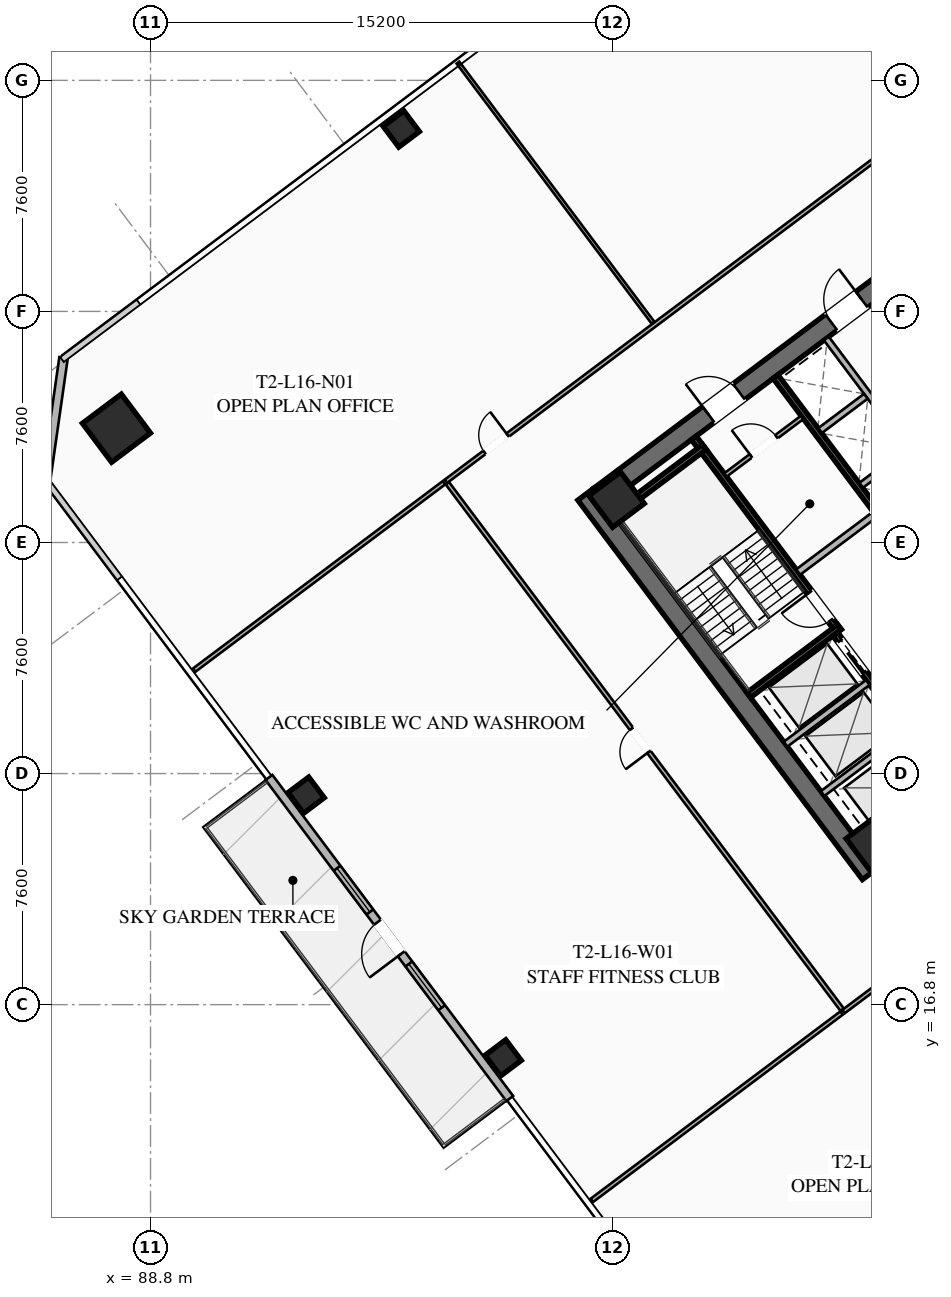
"""IFC4 building model, lengths in metres.
Left out: names, types, materials, properties, quantities, classifications, styles, units other than length and angle.
Written with IfcOpenShell. Run it as: python <this file> out.ifc"""

import sys

from ifc_helpers import new_model, si_unit, direction, frame, frame_2d, origin, origin_2d, place, context, subcontext, project, spatial, rectangle, hollow_rectangle, extrude, element, fill, save


model = new_model("IFC4")
c1 = context("Model", 3, precision=1e-05, world=origin(), true_north=direction((0.0, 1.0)))
c2 = subcontext(c1, "Body", "Model", "MODEL_VIEW")
j1 = project(units=[si_unit("LENGTHUNIT", "METRE"), si_unit("PLANEANGLEUNIT", "RADIAN")], contexts=[c1])
p1 = place(None, origin())
s1 = spatial("IfcSite", under=j1, at=p1, CompositionType="ELEMENT")
p2 = place(p1, origin())
s2 = spatial("IfcBuilding", under=s1, at=p2, CompositionType="ELEMENT")
p3 = place(p2, frame((0.0, 0.0, 63.65)))
s3 = spatial("IfcBuildingStorey", under=s2, at=p3, CompositionType="ELEMENT", Elevation=63.65)
p4 = place(p3, frame((112.476, 21.107, 0.0), z_axis=(0.0, 0.0, 1.0), x_axis=(-0.600005007985, 0.799996243986, 0.0)))
e1 = element("IfcWall", 1, at=p4, inside=s3, PredefinedType="SHEAR", context=c2, shape_type="SweptSolid", body=[
    extrude(rectangle(XDim=15.6, YDim=0.65, at=frame_2d((7.8, 0.0))), origin(), (0.0, 0.0, 1.0), 3.55),
])
p5 = place(p3, frame((124.429, 30.478, 0.0), z_axis=(0.0, 0.0, 1.0), x_axis=(-0.799998028465, -0.600002628705, 0.0)))
e2 = element("IfcWall", 2, at=p5, inside=s3, PredefinedType="SHEAR", context=c2, shape_type="SweptSolid", body=[
    extrude(rectangle(XDim=14.86, YDim=0.65, at=frame_2d((7.43, 0.0))), origin(), (0.0, 0.0, 1.0), 3.55),
])
p6 = place(p5, frame((9.13, 0.0, 0.0)))
e3 = element("IfcOpeningElement", 3, at=p6, cuts=e2, PredefinedType="OPENING", context=c2, shape_type="SweptSolid", body=[
    extrude(rectangle(XDim=1.25, YDim=2.25, at=frame_2d((0.625, 1.125))), frame((0.0, 0.335, 0.0), z_axis=(0.0, -1.0, 0.0), x_axis=(1.0, 0.0, 0.0)), (0.0, 0.0, 1.0), 0.67),
])
p7 = place(p5, frame((4.08, 0.0, 0.0)))
e4 = element("IfcOpeningElement", 4, at=p7, cuts=e2, PredefinedType="OPENING", context=c2, shape_type="SweptSolid", body=[
    extrude(rectangle(XDim=1.25, YDim=2.25, at=frame_2d((0.625, 1.125))), frame((0.0, 0.335, 0.0), z_axis=(0.0, -1.0, 0.0), x_axis=(1.0, 0.0, 0.0)), (0.0, 0.0, 1.0), 0.67),
])
p8 = place(p3, frame((103.571, 33.522, 0.0), z_axis=(0.0, 0.0, 1.0), x_axis=(0.799998028465, 0.600002628705, 0.0)))
e5 = element("IfcWall", 5, at=p8, inside=s3, PredefinedType="SHEAR", context=c2, shape_type="SweptSolid", body=[
    extrude(rectangle(XDim=14.86, YDim=0.65, at=frame_2d((7.43, 0.0))), origin(), (0.0, 0.0, 1.0), 3.55),
])
p9 = place(p8, frame((4.48, 0.0, 0.0)))
e6 = element("IfcOpeningElement", 6, at=p9, cuts=e5, PredefinedType="OPENING", context=c2, shape_type="SweptSolid", body=[
    extrude(rectangle(XDim=1.25, YDim=2.25, at=frame_2d((0.625, 1.125))), frame((0.0, 0.335, 0.0), z_axis=(0.0, -1.0, 0.0), x_axis=(1.0, 0.0, 0.0)), (0.0, 0.0, 1.0), 0.67),
])
p10 = place(p8, frame((9.53, 0.0, 0.0)))
e7 = element("IfcOpeningElement", 7, at=p10, cuts=e5, PredefinedType="OPENING", context=c2, shape_type="SweptSolid", body=[
    extrude(rectangle(XDim=1.25, YDim=2.25, at=frame_2d((0.625, 1.125))), frame((0.0, 0.335, 0.0), z_axis=(0.0, -1.0, 0.0), x_axis=(1.0, 0.0, 0.0)), (0.0, 0.0, 1.0), 0.67),
])
for number, where, z_axis, x_axis in (
    (8, (112.59, 22.13, 0.0), (0.0, 0.0, 1.0), (0.8, 0.6, 0.0)),
    (9, (104.13, 33.41, 0.0), (0.0, 0.0, 1.0), (0.8, 0.6, 0.0)),
):
    element("IfcColumn", number, at=place(p3, frame(where, z_axis=z_axis, x_axis=x_axis)), inside=s3, PredefinedType="COLUMN", context=c2, shape_type="SweptSolid", body=[
        extrude(hollow_rectangle(XDim=1.3, YDim=1.3, WallThickness=0.05, at=origin_2d()), origin(), (0.0, 0.0, 1.0), 3.35),
    ])
p11 = place(p3, frame((87.68, 35.76, 0.0), z_axis=(0.0, 0.0, 1.0), x_axis=(0.799999996291, 0.600000004945, 0.0)))
e10 = element("IfcColumn", 10, at=p11, inside=s3, PredefinedType="COLUMN", context=c2, shape_type="SweptSolid", body=[
    extrude(hollow_rectangle(XDim=1.6, YDim=1.6, WallThickness=0.06, at=origin_2d()), origin(), (0.0, 0.0, 1.0), 3.35),
])
for number, where, z_axis, x_axis in (
    (11, (97.05, 45.6, 0.0), (0.0, 0.0, 1.0), (0.8, 0.6, 0.0)),
    (12, (93.92, 23.69, 0.0), (0.0, 0.0, 1.0), (0.8, 0.6, 0.0)),
    (13, (100.4, 15.05, 0.0), (0.0, 0.0, 1.0), (0.8, 0.6, 0.0)),
):
    element("IfcColumn", number, at=place(p3, frame(where, z_axis=z_axis, x_axis=x_axis)), inside=s3, PredefinedType="COLUMN", context=c2, shape_type="SweptSolid", body=[
        extrude(hollow_rectangle(XDim=0.85, YDim=0.85, WallThickness=0.035, at=origin_2d()), origin(), (0.0, 0.0, 1.0), 3.35),
    ])
p12 = place(p3, frame((100.616, 13.712, 0.0), z_axis=(0.0, 0.0, 1.0), x_axis=(-0.599994081423, 0.800004438899, 0.0)))
e14 = element("IfcWall", 14, at=p12, inside=s3, PredefinedType="SOLIDWALL", context=c2, shape_type="SweptSolid", body=[
    extrude(rectangle(XDim=13.2, YDim=0.28, at=frame_2d((6.6, 0.0))), origin(), (0.0, 0.0, 1.0), 3.35),
])
p13 = place(p12, frame((5.95, 0.0, 0.0)))
e15 = element("IfcOpeningElement", 15, at=p13, cuts=e14, PredefinedType="OPENING", context=c2, shape_type="SweptSolid", body=[
    extrude(rectangle(XDim=1.3, YDim=2.15, at=frame_2d((0.65, 1.075))), frame((0.0, 0.15, 0.0), z_axis=(0.0, -1.0, 0.0), x_axis=(1.0, 0.0, 0.0)), (0.0, 0.0, 1.0), 0.3),
])
p14 = place(p12, frame((3.732, 0.0, 0.85)))
e16 = element("IfcOpeningElement", 16, at=p14, cuts=e14, PredefinedType="OPENING", context=c2, shape_type="SweptSolid", body=[
    extrude(rectangle(XDim=1.8, YDim=1.92, at=frame_2d((0.9, 0.96))), frame((0.0, 0.15, 0.0), z_axis=(0.0, -1.0, 0.0), x_axis=(1.0, 0.0, 0.0)), (0.0, 0.0, 1.0), 0.3),
])
p15 = place(p12, frame((7.668, 0.0, 0.85)))
e17 = element("IfcOpeningElement", 17, at=p15, cuts=e14, PredefinedType="OPENING", context=c2, shape_type="SweptSolid", body=[
    extrude(rectangle(XDim=1.8, YDim=1.92, at=frame_2d((0.9, 0.96))), frame((0.0, 0.15, 0.0), z_axis=(0.0, -1.0, 0.0), x_axis=(1.0, 0.0, 0.0)), (0.0, 0.0, 1.0), 0.3),
])
p16 = place(p3, frame((85.36, 34.02, 0.0), z_axis=(0.0, 0.0, 1.0), x_axis=(0.14137968631, 0.989955445613, 0.0)))
e18 = element("IfcWall", 18, at=p16, inside=s3, PredefinedType="SOLIDWALL", context=c2, shape_type="SweptSolid", body=[
    extrude(rectangle(XDim=4.101, YDim=0.28, at=frame_2d((2.051, 0.0))), origin(), (0.0, 0.0, 1.0), 3.35),
])
p17 = place(p3, frame((111.44, 29.08, 0.0), z_axis=(0.0, 0.0, 1.0), x_axis=(-0.600009827119, 0.799992629566, 0.0)))
e19 = element("IfcWall", 19, at=p17, inside=s3, PredefinedType="SHEAR", context=c2, shape_type="SweptSolid", body=[
    extrude(rectangle(XDim=7.95, YDim=0.2, at=frame_2d((3.975, 0.0))), origin(), (0.0, 0.0, 1.0), 3.35),
])
p18 = place(p17, frame((0.45, 0.0, 0.0)))
e20 = element("IfcOpeningElement", 20, at=p18, cuts=e19, PredefinedType="OPENING", context=c2, shape_type="SweptSolid", body=[
    extrude(rectangle(XDim=1.15, YDim=2.2, at=frame_2d((0.575, 1.1))), frame((0.0, 0.11, 0.0), z_axis=(0.0, -1.0, 0.0), x_axis=(1.0, 0.0, 0.0)), (0.0, 0.0, 1.0), 0.22),
])
for number, where, z_axis, x_axis in (
    (21, (108.476, 26.982, 0.0), (0.0, 0.0, 1.0), (0.8, 0.6, 0.0)),
    (22, (104.036, 32.902, 0.0), (0.0, 0.0, 1.0), (0.8, 0.6, 0.0)),
):
    element("IfcWall", number, at=place(p3, frame(where, z_axis=z_axis, x_axis=x_axis)), inside=s3, PredefinedType="SHEAR", context=c2, shape_type="SweptSolid", body=[
        extrude(rectangle(XDim=3.73, YDim=0.2, at=frame_2d((1.865, 0.0))), origin(), (0.0, 0.0, 1.0), 3.35),
    ])
p19 = place(p3, frame((117.938, 26.016, 0.0), z_axis=(0.0, 0.0, 1.0), x_axis=(-0.600005463273, 0.799995902516, 0.0)))
e23 = element("IfcWall", 23, at=p19, inside=s3, PredefinedType="SHEAR", context=c2, shape_type="SweptSolid", body=[
    extrude(rectangle(XDim=14.3, YDim=0.2, at=frame_2d((7.15, 0.0))), origin(), (0.0, 0.0, 1.0), 3.35),
])
p20 = place(p3, frame((110.104, 31.028, 0.0), z_axis=(0.0, 0.0, 1.0), x_axis=(0.800018601094, 0.59997519774, 0.0)))
e24 = element("IfcWall", 24, at=p20, inside=s3, PredefinedType="SOLIDWALL", context=c2, shape_type="SweptSolid", body=[
    extrude(rectangle(XDim=3.15, YDim=0.22, at=frame_2d((1.575, 0.0))), origin(), (0.0, 0.0, 1.0), 2.493),
])
p21 = place(p3, frame((115.13, 23.91, 0.0), z_axis=(0.0, 0.0, 1.0), x_axis=(-0.599975393228, 0.800018454488, 0.0)))
e25 = element("IfcWall", 25, at=p21, inside=s3, PredefinedType="SHEAR", context=c2, shape_type="SweptSolid", body=[
    extrude(rectangle(XDim=6.35, YDim=0.2, at=frame_2d((3.175, 0.0))), origin(), (0.0, 0.0, 1.0), 3.35),
])
p22 = place(p21, frame((4.775, 0.0, 0.0)))
e26 = element("IfcOpeningElement", 26, at=p22, cuts=e25, PredefinedType="OPENING", context=c2, shape_type="SweptSolid", body=[
    extrude(rectangle(XDim=1.3, YDim=2.25, at=frame_2d((0.65, 1.125))), frame((0.0, 0.11, 0.0), z_axis=(0.0, -1.0, 0.0), x_axis=(1.0, 0.0, 0.0)), (0.0, 0.0, 1.0), 0.22),
])
p23 = place(p21, frame((2.775, 0.0, 0.0)))
e27 = element("IfcOpeningElement", 27, at=p23, cuts=e25, PredefinedType="OPENING", context=c2, shape_type="SweptSolid", body=[
    extrude(rectangle(XDim=1.3, YDim=2.25, at=frame_2d((0.65, 1.125))), frame((0.0, 0.11, 0.0), z_axis=(0.0, -1.0, 0.0), x_axis=(1.0, 0.0, 0.0)), (0.0, 0.0, 1.0), 0.22),
])
p24 = place(p21, frame((0.575, 0.0, 0.0)))
e28 = element("IfcOpeningElement", 28, at=p24, cuts=e25, PredefinedType="OPENING", context=c2, shape_type="SweptSolid", body=[
    extrude(rectangle(XDim=1.3, YDim=2.25, at=frame_2d((0.65, 1.125))), frame((0.0, 0.11, 0.0), z_axis=(0.0, -1.0, 0.0), x_axis=(1.0, 0.0, 0.0)), (0.0, 0.0, 1.0), 0.22),
])
for number, where, z_axis, x_axis in (
    (29, (110.906, 23.742, 0.0), (0.0, 0.0, 1.0), (0.8, 0.6, 0.0)),
    (30, (109.688, 25.366, 0.0), (0.0, 0.0, 1.0), (0.8, 0.6, 0.0)),
):
    element("IfcWall", number, at=place(p3, frame(where, z_axis=z_axis, x_axis=x_axis)), inside=s3, PredefinedType="SOLIDWALL", context=c2, shape_type="SweptSolid", body=[
        extrude(rectangle(XDim=3.38, YDim=0.2, at=frame_2d((1.69, 0.0))), origin(), (0.0, 0.0, 1.0), 3.35),
    ])
p25 = place(p3, frame((107.71, 34.22, 0.0), z_axis=(0.0, 0.0, 1.0), x_axis=(0.799981399002, 0.60002480053, 0.0)))
e31 = element("IfcWall", 31, at=p25, inside=s3, PredefinedType="PARTITIONING", context=c2, shape_type="SweptSolid", body=[
    extrude(rectangle(XDim=3.15, YDim=0.135, at=frame_2d((1.575, 0.0))), origin(), (0.0, 0.0, 1.0), 2.493),
])
p26 = place(p25, frame((1.05, 0.0, 0.0)))
e32 = element("IfcOpeningElement", 32, at=p26, cuts=e31, PredefinedType="OPENING", context=c2, shape_type="SweptSolid", body=[
    extrude(rectangle(XDim=1.05, YDim=2.2, at=frame_2d((0.525, 1.1))), frame((0.0, 0.077, 0.0), z_axis=(0.0, -1.0, 0.0), x_axis=(1.0, 0.0, 0.0)), (0.0, 0.0, 1.0), 0.155),
])
p27 = place(p3, frame((115.11, 33.27, 0.0), z_axis=(0.0, 0.0, 1.0), x_axis=(-0.600011488909, 0.79999138319, 0.0)))
e33 = element("IfcWall", 33, at=p27, inside=s3, PredefinedType="SOLIDWALL", context=c2, shape_type="SweptSolid", body=[
    extrude(rectangle(XDim=6.8, YDim=0.2, at=frame_2d((3.4, 0.0))), origin(), (0.0, 0.0, 1.0), 3.35),
])
p28 = place(p3, frame((112.176, 33.882, 0.0), z_axis=(0.0, 0.0, 1.0), x_axis=(0.8, 0.6, 0.0)))
e34 = element("IfcWall", 34, at=p28, inside=s3, PredefinedType="SOLIDWALL", context=c2, shape_type="SweptSolid", body=[
    extrude(rectangle(XDim=1.88, YDim=0.2, at=frame_2d((0.94, 0.0))), origin(), (0.0, 0.0, 1.0), 3.35),
])
p29 = place(p3, frame((110.826, 35.682, 0.0), z_axis=(0.0, 0.0, 1.0), x_axis=(0.799984418148, 0.600020775241, 0.0)))
e35 = element("IfcWall", 35, at=p29, inside=s3, PredefinedType="SOLIDWALL", context=c2, shape_type="SweptSolid", body=[
    extrude(rectangle(XDim=1.88, YDim=0.2, at=frame_2d((0.94, 0.0))), origin(), (0.0, 0.0, 1.0), 3.35),
])
p30 = place(p3, frame((98.516, 34.012, 0.0), z_axis=(0.0, 0.0, 1.0), x_axis=(0.799998035726, 0.600002619023, 0.0)))
e36 = element("IfcWall", 36, at=p30, inside=s3, PredefinedType="PARTITIONING", context=c2, shape_type="SweptSolid", body=[
    extrude(rectangle(XDim=29.83, YDim=0.135, at=frame_2d((14.915, 0.0))), origin(), (0.0, 0.0, 1.0), 2.493),
])
p31 = place(p30, frame((1.587, 0.0, 0.0)))
e37 = element("IfcOpeningElement", 37, at=p31, cuts=e36, PredefinedType="OPENING", context=c2, shape_type="SweptSolid", body=[
    extrude(rectangle(XDim=0.95, YDim=2.05, at=frame_2d((0.475, 1.025))), frame((0.0, 0.077, 0.0), z_axis=(0.0, -1.0, 0.0), x_axis=(1.0, 0.0, 0.0)), (0.0, 0.0, 1.0), 0.155),
])
p32 = place(p30, frame((28.58, 0.0, 0.0)))
e38 = element("IfcOpeningElement", 38, at=p32, cuts=e36, PredefinedType="OPENING", context=c2, shape_type="SweptSolid", body=[
    extrude(rectangle(XDim=0.95, YDim=2.05, at=frame_2d((0.475, 1.025))), frame((0.0, 0.077, 0.0), z_axis=(0.0, -1.0, 0.0), x_axis=(1.0, 0.0, 0.0)), (0.0, 0.0, 1.0), 0.155),
])
p33 = place(p3, frame((105.332, 39.224, 0.0), z_axis=(0.0, 0.0, 1.0), x_axis=(-0.600003650761, 0.799997261916, 0.0)))
e39 = element("IfcWall", 39, at=p33, inside=s3, PredefinedType="PARTITIONING", context=c2, shape_type="SweptSolid", body=[
    extrude(rectangle(XDim=10.7, YDim=0.11, at=frame_2d((5.35, 0.0))), origin(), (0.0, 0.0, 1.0), 2.493),
])
p34 = place(p3, frame((135.46, 34.47, 0.0), z_axis=(0.0, 0.0, 1.0), x_axis=(-0.800000982127, -0.599998690494, 0.0)))
e40 = element("IfcWall", 40, at=p34, inside=s3, PredefinedType="PARTITIONING", context=c2, shape_type="SweptSolid", body=[
    extrude(rectangle(XDim=29.83, YDim=0.135, at=frame_2d((14.915, 0.0))), origin(), (0.0, 0.0, 1.0), 2.493),
])
p35 = place(p34, frame((27.431, 0.0, 0.0)))
e41 = element("IfcOpeningElement", 41, at=p35, cuts=e40, PredefinedType="OPENING", context=c2, shape_type="SweptSolid", body=[
    extrude(rectangle(XDim=0.95, YDim=2.05, at=frame_2d((0.475, 1.025))), frame((0.0, 0.077, 0.0), z_axis=(0.0, -1.0, 0.0), x_axis=(1.0, 0.0, 0.0)), (0.0, 0.0, 1.0), 0.155),
])
p36 = place(p34, frame((18.43, 0.0, 0.0)))
e42 = element("IfcOpeningElement", 42, at=p36, cuts=e40, PredefinedType="OPENING", context=c2, shape_type="SweptSolid", body=[
    extrude(rectangle(XDim=0.95, YDim=2.05, at=frame_2d((0.475, 1.025))), frame((0.0, 0.077, 0.0), z_axis=(0.0, -1.0, 0.0), x_axis=(1.0, 0.0, 0.0)), (0.0, 0.0, 1.0), 0.155),
])
p37 = place(p34, frame((0.38, 0.0, 0.0)))
e43 = element("IfcOpeningElement", 43, at=p37, cuts=e40, PredefinedType="OPENING", context=c2, shape_type="SweptSolid", body=[
    extrude(rectangle(XDim=0.95, YDim=2.05, at=frame_2d((0.475, 1.025))), frame((0.0, 0.077, 0.0), z_axis=(0.0, -1.0, 0.0), x_axis=(1.0, 0.0, 0.0)), (0.0, 0.0, 1.0), 0.155),
])
p38 = place(p3, frame((111.548, 16.636, 0.0), z_axis=(0.0, 0.0, 1.0), x_axis=(-0.600003610192, 0.799997292343, 0.0)))
e44 = element("IfcWall", 44, at=p38, inside=s3, PredefinedType="PARTITIONING", context=c2, shape_type="SweptSolid", body=[
    extrude(rectangle(XDim=21.64, YDim=0.135, at=frame_2d((10.82, 0.0))), origin(), (0.0, 0.0, 1.0), 2.493),
])
p39 = place(p38, frame((10.596, 0.0, 0.0)))
e45 = element("IfcOpeningElement", 45, at=p39, cuts=e44, PredefinedType="OPENING", context=c2, shape_type="SweptSolid", body=[
    extrude(rectangle(XDim=0.95, YDim=2.05, at=frame_2d((0.475, 1.025))), frame((0.0, 0.077, 0.0), z_axis=(0.0, -1.0, 0.0), x_axis=(1.0, 0.0, 0.0)), (0.0, 0.0, 1.0), 0.155),
])
for number, where, z_axis, x_axis in (
    (46, (98.452, 33.964, 0.0), (0.0, 0.0, 1.0), (-0.8, -0.6, 0.0)),
    (47, (103.316, 10.362, 0.0), (0.0, 0.0, 1.0), (0.8, 0.6, 0.0)),
):
    element("IfcWall", number, at=place(p3, frame(where, z_axis=z_axis, x_axis=x_axis)), inside=s3, PredefinedType="PARTITIONING", context=c2, shape_type="SweptSolid", body=[
        extrude(rectangle(XDim=10.27, YDim=0.135, at=frame_2d((5.135, 0.0))), origin(), (0.0, 0.0, 1.0), 2.493),
    ])
p40 = place(p13, origin())
e48 = element("IfcDoor", 48, at=p40, inside=s3, OperationType="SINGLE_SWING_LEFT", PredefinedType="DOOR", context=c2, shape_type="SweptSolid", body=[
    extrude(rectangle(XDim=1.3, YDim=2.15, at=frame_2d((0.65, 1.075))), frame((0.0, 0.025, 0.0), z_axis=(0.0, -1.0, 0.0), x_axis=(1.0, 0.0, 0.0)), (0.0, 0.0, 1.0), 0.05),
])
fill(e15, e48)
p41 = place(p14, origin())
e49 = element("IfcWindow", 49, at=p41, inside=s3, PartitioningType="SINGLE_PANEL", PredefinedType="WINDOW", context=c2, shape_type="SweptSolid", body=[
    extrude(rectangle(XDim=1.8, YDim=1.92, at=frame_2d((0.9, 0.96))), frame((0.0, 0.03, 0.0), z_axis=(0.0, -1.0, 0.0), x_axis=(1.0, 0.0, 0.0)), (0.0, 0.0, 1.0), 0.06),
])
fill(e16, e49)
p42 = place(p15, origin())
e50 = element("IfcWindow", 50, at=p42, inside=s3, PartitioningType="SINGLE_PANEL", PredefinedType="WINDOW", context=c2, shape_type="SweptSolid", body=[
    extrude(rectangle(XDim=1.8, YDim=1.92, at=frame_2d((0.9, 0.96))), frame((0.0, 0.03, 0.0), z_axis=(0.0, -1.0, 0.0), x_axis=(1.0, 0.0, 0.0)), (0.0, 0.0, 1.0), 0.06),
])
fill(e17, e50)
p43 = place(p9, origin())
e51 = element("IfcDoor", 51, at=p43, inside=s3, OperationType="SINGLE_SWING_LEFT", PredefinedType="DOOR", context=c2, shape_type="SweptSolid", body=[
    extrude(rectangle(XDim=1.25, YDim=2.25, at=frame_2d((0.625, 1.125))), frame((0.0, 0.025, 0.0), z_axis=(0.0, -1.0, 0.0), x_axis=(1.0, 0.0, 0.0)), (0.0, 0.0, 1.0), 0.05),
])
fill(e6, e51)
p44 = place(p10, origin())
e52 = element("IfcDoor", 52, at=p44, inside=s3, OperationType="SINGLE_SWING_RIGHT", PredefinedType="DOOR", context=c2, shape_type="SweptSolid", body=[
    extrude(rectangle(XDim=1.25, YDim=2.25, at=frame_2d((0.625, 1.125))), frame((0.0, 0.025, 0.0), z_axis=(0.0, -1.0, 0.0), x_axis=(1.0, 0.0, 0.0)), (0.0, 0.0, 1.0), 0.05),
])
fill(e7, e52)
p45 = place(p18, origin())
e53 = element("IfcDoor", 53, at=p45, inside=s3, OperationType="SINGLE_SWING_RIGHT", PredefinedType="DOOR", context=c2, shape_type="SweptSolid", body=[
    extrude(rectangle(XDim=1.15, YDim=2.2, at=frame_2d((0.575, 1.1))), frame((0.0, 0.025, 0.0), z_axis=(0.0, -1.0, 0.0), x_axis=(1.0, 0.0, 0.0)), (0.0, 0.0, 1.0), 0.05),
])
fill(e20, e53)
p46 = place(p26, origin())
e54 = element("IfcDoor", 54, at=p46, inside=s3, OperationType="SINGLE_SWING_LEFT", PredefinedType="DOOR", context=c2, shape_type="SweptSolid", body=[
    extrude(rectangle(XDim=1.05, YDim=2.2, at=frame_2d((0.525, 1.1))), frame((0.0, 0.025, 0.0), z_axis=(0.0, -1.0, 0.0), x_axis=(1.0, 0.0, 0.0)), (0.0, 0.0, 1.0), 0.05),
])
fill(e32, e54)
p47 = place(p31, origin())
e55 = element("IfcDoor", 55, at=p47, inside=s3, OperationType="SINGLE_SWING_RIGHT", PredefinedType="DOOR", context=c2, shape_type="SweptSolid", body=[
    extrude(rectangle(XDim=0.95, YDim=2.05, at=frame_2d((0.475, 1.025))), frame((0.0, 0.025, 0.0), z_axis=(0.0, -1.0, 0.0), x_axis=(1.0, 0.0, 0.0)), (0.0, 0.0, 1.0), 0.05),
])
fill(e37, e55)
p48 = place(p39, origin())
e56 = element("IfcDoor", 56, at=p48, inside=s3, OperationType="SINGLE_SWING_LEFT", PredefinedType="DOOR", context=c2, shape_type="SweptSolid", body=[
    extrude(rectangle(XDim=0.95, YDim=2.05, at=frame_2d((0.475, 1.025))), frame((0.0, 0.025, 0.0), z_axis=(0.0, -1.0, 0.0), x_axis=(1.0, 0.0, 0.0)), (0.0, 0.0, 1.0), 0.05),
])
fill(e45, e56)
p49 = place(p22, origin())
e57 = element("IfcDoor", 57, at=p49, inside=s3, OperationType="SLIDING_TO_LEFT", PredefinedType="DOOR", context=c2, shape_type="SweptSolid", body=[
    extrude(rectangle(XDim=1.3, YDim=2.25, at=frame_2d((0.65, 1.125))), frame((0.0, 0.025, 0.0), z_axis=(0.0, -1.0, 0.0), x_axis=(1.0, 0.0, 0.0)), (0.0, 0.0, 1.0), 0.05),
])
fill(e26, e57)
save(model, sys.argv[1])
